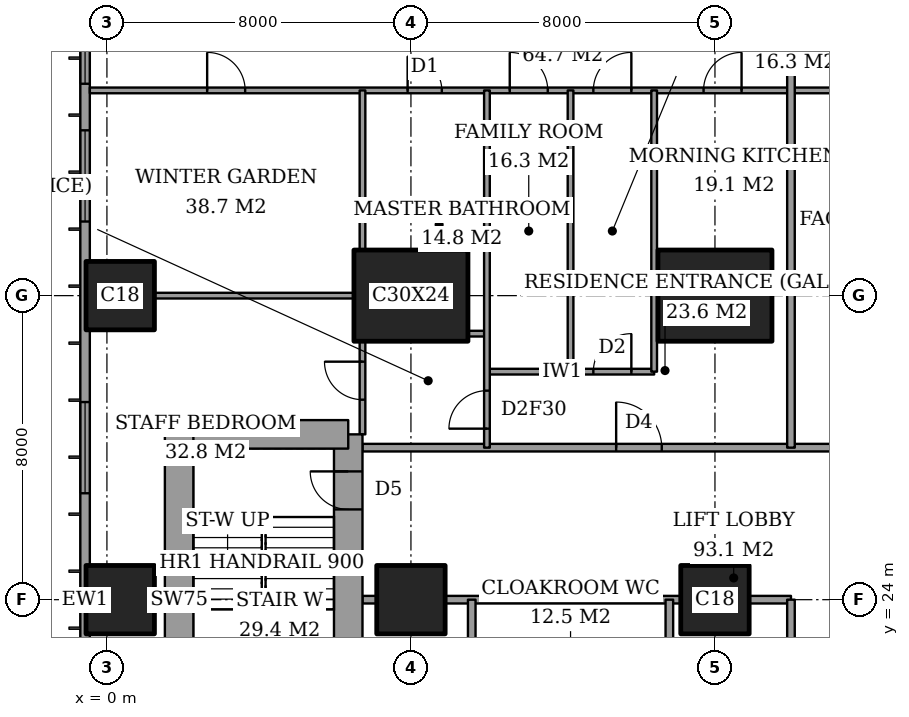
"""IFC4 building model, lengths in metres.
Left out: names, types, materials, properties, quantities, classifications, styles, units other than length and angle.
Written with IfcOpenShell. Run it as: python <this file> out.ifc"""

import sys

from ifc_helpers import new_model, si_unit, direction, frame, frame_2d, origin, origin_2d, place, context, subcontext, project, spatial, rectangle, extrude, element, fill, save


model = new_model("IFC4")
c1 = context("Model", 3, precision=1e-05, world=origin(), true_north=direction((0.0, 1.0)))
c2 = subcontext(c1, "Body", "Model", "MODEL_VIEW")
j1 = project(units=[si_unit("LENGTHUNIT", "METRE"), si_unit("PLANEANGLEUNIT", "RADIAN")], contexts=[c1])
p1 = place(None, origin())
s1 = spatial("IfcSite", under=j1, at=p1, CompositionType="ELEMENT")
p2 = place(p1, origin())
s2 = spatial("IfcBuilding", under=s1, at=p2, CompositionType="ELEMENT")
p3 = place(p2, frame((0.0, 0.0, 182.2)))
s3 = spatial("IfcBuildingStorey", under=s2, at=p3, CompositionType="ELEMENT", Elevation=182.2)
for number, where, z_axis, x_axis in (
    (1, (0.35, 24.0, 0.0), (0.0, 0.0, 1.0), (1.0, 0.0, 0.0)),
    (2, (0.35, 32.0, 0.0), (0.0, 0.0, 1.0), (1.0, 0.0, 0.0)),
    (3, (8.0, 24.0, 0.0), (0.0, 0.0, 1.0), (1.0, 0.0, 0.0)),
):
    element("IfcColumn", number, at=place(p3, frame(where, z_axis=z_axis, x_axis=x_axis)), inside=s3, PredefinedType="COLUMN", context=c2, shape_type="SweptSolid", body=[
        extrude(rectangle(XDim=1.8, YDim=1.8, at=origin_2d()), origin(), (0.0, 0.0, 1.0), 3.6),
    ])
p4 = place(p3, frame((8.0, 32.0, 0.0), z_axis=(0.0, 0.0, 1.0), x_axis=(1.0, 0.0, 0.0)))
e4 = element("IfcColumn", 4, at=p4, inside=s3, PredefinedType="COLUMN", context=c2, shape_type="SweptSolid", body=[
    extrude(rectangle(XDim=3.0, YDim=2.4, at=origin_2d()), origin(), (0.0, 0.0, 1.0), 3.6),
])
p5 = place(p3, frame((16.0, 24.0, 0.0), z_axis=(0.0, 0.0, 1.0), x_axis=(1.0, 0.0, 0.0)))
e5 = element("IfcColumn", 5, at=p5, inside=s3, PredefinedType="COLUMN", context=c2, shape_type="SweptSolid", body=[
    extrude(rectangle(XDim=1.8, YDim=1.8, at=origin_2d()), origin(), (0.0, 0.0, 1.0), 3.6),
])
p6 = place(p3, frame((16.0, 32.0, 0.0), z_axis=(0.0, 0.0, 1.0), x_axis=(1.0, 0.0, 0.0)))
e6 = element("IfcColumn", 6, at=p6, inside=s3, PredefinedType="COLUMN", context=c2, shape_type="SweptSolid", body=[
    extrude(rectangle(XDim=3.0, YDim=2.4, at=origin_2d()), origin(), (0.0, 0.0, 1.0), 3.6),
])
p7 = place(p3, frame((6.35, 19.65, 0.0), z_axis=(0.0, 0.0, 1.0), x_axis=(0.0, 1.0, 0.0)))
e7 = element("IfcWall", 7, at=p7, inside=s3, PredefinedType="SHEAR", context=c2, shape_type="SweptSolid", body=[
    extrude(rectangle(XDim=8.7, YDim=0.75, at=frame_2d((4.35, 0.0))), origin(), (0.0, 0.0, 1.0), 3.6),
])
p8 = place(p7, frame((6.725, 0.0, 0.0)))
e8 = element("IfcOpeningElement", 8, at=p8, cuts=e7, PredefinedType="OPENING", context=c2, shape_type="SweptSolid", body=[
    extrude(rectangle(XDim=1.0, YDim=2.1, at=frame_2d((0.5, 1.05))), frame((0.0, 0.385, 0.0), z_axis=(0.0, -1.0, 0.0), x_axis=(1.0, 0.0, 0.0)), (0.0, 0.0, 1.0), 0.77),
])
p9 = place(p3, frame((6.35, 28.35, 0.0), z_axis=(0.0, 0.0, 1.0), x_axis=(-1.0, 0.0, 0.0)))
e9 = element("IfcWall", 9, at=p9, inside=s3, PredefinedType="SHEAR", context=c2, shape_type="SweptSolid", body=[
    extrude(rectangle(XDim=4.45, YDim=0.75, at=frame_2d((2.225, 0.0))), origin(), (0.0, 0.0, 1.0), 3.6),
])
p10 = place(p3, frame((1.9, 28.35, 0.0), z_axis=(0.0, 0.0, 1.0), x_axis=(0.0, -1.0, 0.0)))
e10 = element("IfcWall", 10, at=p10, inside=s3, PredefinedType="SHEAR", context=c2, shape_type="SweptSolid", body=[
    extrude(rectangle(XDim=8.7, YDim=0.75, at=frame_2d((4.35, 0.0))), origin(), (0.0, 0.0, 1.0), 3.6),
])
p11 = place(p3, frame((-0.575, 44.825, 0.0), z_axis=(0.0, 0.0, 1.0), x_axis=(0.0, -1.0, 0.0)))
e11 = element("IfcWall", 11, at=p11, inside=s3, PredefinedType="SOLIDWALL", context=c2, shape_type="SweptSolid", body=[
    extrude(rectangle(XDim=41.65, YDim=0.25, at=frame_2d((20.825, 0.0))), origin(), (0.0, 0.0, 1.0), 3.6),
])
p12 = place(p11, frame((0.825, 0.0, 0.2)))
e12 = element("IfcOpeningElement", 12, at=p12, cuts=e11, PredefinedType="OPENING", context=c2, shape_type="SweptSolid", body=[
    extrude(rectangle(XDim=2.4, YDim=2.4, at=frame_2d((1.2, 1.2))), frame((0.0, 0.135, 0.0), z_axis=(0.0, -1.0, 0.0), x_axis=(1.0, 0.0, 0.0)), (0.0, 0.0, 1.0), 0.27),
])
p13 = place(p11, frame((6.05, 0.0, 0.2)))
e13 = element("IfcOpeningElement", 13, at=p13, cuts=e11, PredefinedType="OPENING", context=c2, shape_type="SweptSolid", body=[
    extrude(rectangle(XDim=1.2, YDim=2.4, at=frame_2d((0.6, 1.2))), frame((0.0, 0.135, 0.0), z_axis=(0.0, -1.0, 0.0), x_axis=(1.0, 0.0, 0.0)), (0.0, 0.0, 1.0), 0.27),
])
p14 = place(p11, frame((8.475, 0.0, 0.2)))
e14 = element("IfcOpeningElement", 14, at=p14, cuts=e11, PredefinedType="OPENING", context=c2, shape_type="SweptSolid", body=[
    extrude(rectangle(XDim=2.4, YDim=2.4, at=frame_2d((1.2, 1.2))), frame((0.0, 0.135, 0.0), z_axis=(0.0, -1.0, 0.0), x_axis=(1.0, 0.0, 0.0)), (0.0, 0.0, 1.0), 0.27),
])
p15 = place(p11, frame((15.625, 0.0, 0.2)))
e15 = element("IfcOpeningElement", 15, at=p15, cuts=e11, PredefinedType="OPENING", context=c2, shape_type="SweptSolid", body=[
    extrude(rectangle(XDim=2.4, YDim=2.4, at=frame_2d((1.2, 1.2))), frame((0.0, 0.135, 0.0), z_axis=(0.0, -1.0, 0.0), x_axis=(1.0, 0.0, 0.0)), (0.0, 0.0, 1.0), 0.27),
])
p16 = place(p11, frame((23.625, 0.0, 0.2)))
e16 = element("IfcOpeningElement", 16, at=p16, cuts=e11, PredefinedType="OPENING", context=c2, shape_type="SweptSolid", body=[
    extrude(rectangle(XDim=2.4, YDim=2.4, at=frame_2d((1.2, 1.2))), frame((0.0, 0.135, 0.0), z_axis=(0.0, -1.0, 0.0), x_axis=(1.0, 0.0, 0.0)), (0.0, 0.0, 1.0), 0.27),
])
p17 = place(p11, frame((30.775, 0.0, 0.2)))
e17 = element("IfcOpeningElement", 17, at=p17, cuts=e11, PredefinedType="OPENING", context=c2, shape_type="SweptSolid", body=[
    extrude(rectangle(XDim=2.4, YDim=2.4, at=frame_2d((1.2, 1.2))), frame((0.0, 0.135, 0.0), z_axis=(0.0, -1.0, 0.0), x_axis=(1.0, 0.0, 0.0)), (0.0, 0.0, 1.0), 0.27),
])
p18 = place(p11, frame((34.55, 0.0, 0.2)))
e18 = element("IfcOpeningElement", 18, at=p18, cuts=e11, PredefinedType="OPENING", context=c2, shape_type="SweptSolid", body=[
    extrude(rectangle(XDim=1.2, YDim=2.4, at=frame_2d((0.6, 1.2))), frame((0.0, 0.135, 0.0), z_axis=(0.0, -1.0, 0.0), x_axis=(1.0, 0.0, 0.0)), (0.0, 0.0, 1.0), 0.27),
])
p19 = place(p11, frame((38.425, 0.0, 0.2)))
e19 = element("IfcOpeningElement", 19, at=p19, cuts=e11, PredefinedType="OPENING", context=c2, shape_type="SweptSolid", body=[
    extrude(rectangle(XDim=2.4, YDim=2.4, at=frame_2d((1.2, 1.2))), frame((0.0, 0.135, 0.0), z_axis=(0.0, -1.0, 0.0), x_axis=(1.0, 0.0, 0.0)), (0.0, 0.0, 1.0), 0.27),
])
p20 = place(p3, frame((6.725, 24.0, 0.0), z_axis=(0.0, 0.0, 1.0), x_axis=(1.0, 0.0, 0.0)))
e20 = element("IfcWall", 20, at=p20, inside=s3, PredefinedType="PARTITIONING", context=c2, shape_type="SweptSolid", body=[
    extrude(rectangle(XDim=0.375, YDim=0.2, at=frame_2d((0.188, 0.0))), origin(), (0.0, 0.0, 1.0), 3.35),
])
p21 = place(p3, frame((8.9, 24.0, 0.0), z_axis=(0.0, 0.0, 1.0), x_axis=(1.0, 0.0, 0.0)))
e21 = element("IfcWall", 21, at=p21, inside=s3, PredefinedType="PARTITIONING", context=c2, shape_type="SweptSolid", body=[
    extrude(rectangle(XDim=6.2, YDim=0.2, at=frame_2d((3.1, 0.0))), origin(), (0.0, 0.0, 1.0), 3.35),
])
p22 = place(p3, frame((16.9, 24.0, 0.0), z_axis=(0.0, 0.0, 1.0), x_axis=(1.0, 0.0, 0.0)))
e22 = element("IfcWall", 22, at=p22, inside=s3, PredefinedType="PARTITIONING", context=c2, shape_type="SweptSolid", body=[
    extrude(rectangle(XDim=1.1, YDim=0.2, at=frame_2d((0.55, 0.0))), origin(), (0.0, 0.0, 1.0), 3.35),
])
p23 = place(p3, frame((6.725, 28.0, 0.0), z_axis=(0.0, 0.0, 1.0), x_axis=(1.0, 0.0, 0.0)))
e23 = element("IfcWall", 23, at=p23, inside=s3, PredefinedType="PARTITIONING", context=c2, shape_type="SweptSolid", body=[
    extrude(rectangle(XDim=17.275, YDim=0.2, at=frame_2d((8.637, 0.0))), origin(), (0.0, 0.0, 1.0), 3.35),
])
p24 = place(p23, frame((6.675, 0.0, 0.0)))
e24 = element("IfcOpeningElement", 24, at=p24, cuts=e23, PredefinedType="OPENING", context=c2, shape_type="SweptSolid", body=[
    extrude(rectangle(XDim=1.2, YDim=2.4, at=frame_2d((0.6, 1.2))), frame((0.0, 0.11, 0.0), z_axis=(0.0, -1.0, 0.0), x_axis=(1.0, 0.0, 0.0)), (0.0, 0.0, 1.0), 0.22),
])
p25 = place(p23, frame((13.775, 0.0, 0.0)))
e25 = element("IfcOpeningElement", 25, at=p25, cuts=e23, PredefinedType="OPENING", context=c2, shape_type="SweptSolid", body=[
    extrude(rectangle(XDim=1.0, YDim=2.1, at=frame_2d((0.5, 1.05))), frame((0.0, 0.11, 0.0), z_axis=(0.0, -1.0, 0.0), x_axis=(1.0, 0.0, 0.0)), (0.0, 0.0, 1.0), 0.22),
])
p26 = place(p3, frame((10.0, 30.0, 0.0), z_axis=(0.0, 0.0, 1.0), x_axis=(1.0, 0.0, 0.0)))
e26 = element("IfcWall", 26, at=p26, inside=s3, PredefinedType="PARTITIONING", context=c2, shape_type="SweptSolid", body=[
    extrude(rectangle(XDim=4.4, YDim=0.15, at=frame_2d((2.2, 0.0))), origin(), (0.0, 0.0, 1.0), 3.35),
])
p27 = place(p26, frame((2.8, 0.0, 0.0)))
e27 = element("IfcOpeningElement", 27, at=p27, cuts=e26, PredefinedType="OPENING", context=c2, shape_type="SweptSolid", body=[
    extrude(rectangle(XDim=1.0, YDim=2.1, at=frame_2d((0.5, 1.05))), frame((0.0, 0.085, 0.0), z_axis=(0.0, -1.0, 0.0), x_axis=(1.0, 0.0, 0.0)), (0.0, 0.0, 1.0), 0.17),
])
p28 = place(p3, frame((9.5, 31.0, 0.0), z_axis=(0.0, 0.0, 1.0), x_axis=(1.0, 0.0, 0.0)))
e28 = element("IfcWall", 28, at=p28, inside=s3, PredefinedType="PARTITIONING", context=c2, shape_type="SweptSolid", body=[
    extrude(rectangle(XDim=0.5, YDim=0.15, at=frame_2d((0.25, 0.0))), origin(), (0.0, 0.0, 1.0), 3.35),
])
p29 = place(p3, frame((1.25, 32.0, 0.0), z_axis=(0.0, 0.0, 1.0), x_axis=(1.0, 0.0, 0.0)))
e29 = element("IfcWall", 29, at=p29, inside=s3, PredefinedType="PARTITIONING", context=c2, shape_type="SweptSolid", body=[
    extrude(rectangle(XDim=5.25, YDim=0.15, at=frame_2d((2.625, 0.0))), origin(), (0.0, 0.0, 1.0), 2.634),
])
p30 = place(p3, frame((17.5, 32.1, 0.0), z_axis=(0.0, 0.0, 1.0), x_axis=(1.0, 0.0, 0.0)))
e30 = element("IfcWall", 30, at=p30, inside=s3, PredefinedType="PARTITIONING", context=c2, shape_type="SweptSolid", body=[
    extrude(rectangle(XDim=0.5, YDim=0.15, at=frame_2d((0.25, 0.0))), origin(), (0.0, 0.0, 1.0), 2.634),
])
p31 = place(p3, frame((-0.45, 37.4, 0.0), z_axis=(0.0, 0.0, 1.0), x_axis=(1.0, 0.0, 0.0)))
e31 = element("IfcWall", 31, at=p31, inside=s3, PredefinedType="PARTITIONING", context=c2, shape_type="SweptSolid", body=[
    extrude(rectangle(XDim=24.9, YDim=0.15, at=frame_2d((12.45, 0.0))), origin(), (0.0, 0.0, 1.0), 3.35),
])
p32 = place(p31, frame((13.25, 0.0, 0.0)))
e32 = element("IfcOpeningElement", 32, at=p32, cuts=e31, PredefinedType="OPENING", context=c2, shape_type="SweptSolid", body=[
    extrude(rectangle(XDim=1.0, YDim=2.1, at=frame_2d((0.5, 1.05))), frame((0.0, 0.085, 0.0), z_axis=(0.0, -1.0, 0.0), x_axis=(1.0, 0.0, 0.0)), (0.0, 0.0, 1.0), 0.17),
])
p33 = place(p31, frame((3.087, 0.0, 0.0)))
e33 = element("IfcOpeningElement", 33, at=p33, cuts=e31, PredefinedType="OPENING", context=c2, shape_type="SweptSolid", body=[
    extrude(rectangle(XDim=1.0, YDim=2.1, at=frame_2d((0.5, 1.05))), frame((0.0, 0.085, 0.0), z_axis=(0.0, -1.0, 0.0), x_axis=(1.0, 0.0, 0.0)), (0.0, 0.0, 1.0), 0.17),
])
p34 = place(p31, frame((8.363, 0.0, 0.0)))
e34 = element("IfcOpeningElement", 34, at=p34, cuts=e31, PredefinedType="OPENING", context=c2, shape_type="SweptSolid", body=[
    extrude(rectangle(XDim=0.9, YDim=2.1, at=frame_2d((0.45, 1.05))), frame((0.0, 0.085, 0.0), z_axis=(0.0, -1.0, 0.0), x_axis=(1.0, 0.0, 0.0)), (0.0, 0.0, 1.0), 0.17),
])
p35 = place(p31, frame((11.05, 0.0, 0.0)))
e35 = element("IfcOpeningElement", 35, at=p35, cuts=e31, PredefinedType="OPENING", context=c2, shape_type="SweptSolid", body=[
    extrude(rectangle(XDim=1.0, YDim=2.1, at=frame_2d((0.5, 1.05))), frame((0.0, 0.085, 0.0), z_axis=(0.0, -1.0, 0.0), x_axis=(1.0, 0.0, 0.0)), (0.0, 0.0, 1.0), 0.17),
])
p36 = place(p31, frame((16.15, 0.0, 0.0)))
e36 = element("IfcOpeningElement", 36, at=p36, cuts=e31, PredefinedType="OPENING", context=c2, shape_type="SweptSolid", body=[
    extrude(rectangle(XDim=1.0, YDim=2.1, at=frame_2d((0.5, 1.05))), frame((0.0, 0.085, 0.0), z_axis=(0.0, -1.0, 0.0), x_axis=(1.0, 0.0, 0.0)), (0.0, 0.0, 1.0), 0.17),
])
p37 = place(p3, frame((18.0, 38.2, 0.0), z_axis=(0.0, 0.0, 1.0), x_axis=(1.0, 0.0, 0.0)))
e37 = element("IfcWall", 37, at=p37, inside=s3, PredefinedType="PARTITIONING", context=c2, shape_type="SweptSolid", body=[
    extrude(rectangle(XDim=6.45, YDim=0.2, at=frame_2d((3.225, 0.0))), origin(), (0.0, 0.0, 1.0), 3.35),
])
p38 = place(p3, frame((6.725, 28.35, 0.0), z_axis=(0.0, 0.0, 1.0), x_axis=(0.0, 1.0, 0.0)))
e38 = element("IfcWall", 38, at=p38, inside=s3, PredefinedType="PARTITIONING", context=c2, shape_type="SweptSolid", body=[
    extrude(rectangle(XDim=2.45, YDim=0.15, at=frame_2d((1.225, 0.0))), origin(), (0.0, 0.0, 1.0), 3.35),
])
p39 = place(p38, frame((0.913, 0.0, 0.0)))
e39 = element("IfcOpeningElement", 39, at=p39, cuts=e38, PredefinedType="OPENING", context=c2, shape_type="SweptSolid", body=[
    extrude(rectangle(XDim=1.0, YDim=2.1, at=frame_2d((0.5, 1.05))), frame((0.0, 0.085, 0.0), z_axis=(0.0, -1.0, 0.0), x_axis=(1.0, 0.0, 0.0)), (0.0, 0.0, 1.0), 0.17),
])
p40 = place(p3, frame((6.725, 33.2, 0.0), z_axis=(0.0, 0.0, 1.0), x_axis=(0.0, 1.0, 0.0)))
e40 = element("IfcWall", 40, at=p40, inside=s3, PredefinedType="PARTITIONING", context=c2, shape_type="SweptSolid", body=[
    extrude(rectangle(XDim=4.2, YDim=0.15, at=frame_2d((2.1, 0.0))), origin(), (0.0, 0.0, 1.0), 3.35),
])
p41 = place(p3, frame((9.6, 21.6, 0.0), z_axis=(0.0, 0.0, 1.0), x_axis=(0.0, 1.0, 0.0)))
e41 = element("IfcWall", 41, at=p41, inside=s3, PredefinedType="PARTITIONING", context=c2, shape_type="SweptSolid", body=[
    extrude(rectangle(XDim=2.4, YDim=0.2, at=frame_2d((1.2, 0.0))), origin(), (0.0, 0.0, 1.0), 3.35),
])
p42 = place(p3, frame((10.0, 28.0, 0.0), z_axis=(0.0, 0.0, 1.0), x_axis=(0.0, 1.0, 0.0)))
e42 = element("IfcWall", 42, at=p42, inside=s3, PredefinedType="PARTITIONING", context=c2, shape_type="SweptSolid", body=[
    extrude(rectangle(XDim=9.4, YDim=0.15, at=frame_2d((4.7, 0.0))), origin(), (0.0, 0.0, 1.0), 3.35),
])
p43 = place(p42, frame((0.5, 0.0, 0.0)))
e43 = element("IfcOpeningElement", 43, at=p43, cuts=e42, PredefinedType="OPENING", context=c2, shape_type="SweptSolid", body=[
    extrude(rectangle(XDim=1.0, YDim=2.1, at=frame_2d((0.5, 1.05))), frame((0.0, 0.085, 0.0), z_axis=(0.0, -1.0, 0.0), x_axis=(1.0, 0.0, 0.0)), (0.0, 0.0, 1.0), 0.17),
])
for number, where, z_axis, x_axis in (
    (44, (12.2, 30.0, 0.0), (0.0, 0.0, 1.0), (0.0, 1.0, 0.0)),
    (45, (14.4, 30.0, 0.0), (0.0, 0.0, 1.0), (0.0, 1.0, 0.0)),
):
    element("IfcWall", number, at=place(p3, frame(where, z_axis=z_axis, x_axis=x_axis)), inside=s3, PredefinedType="PARTITIONING", context=c2, shape_type="SweptSolid", body=[
        extrude(rectangle(XDim=7.4, YDim=0.15, at=frame_2d((3.7, 0.0))), origin(), (0.0, 0.0, 1.0), 3.35),
    ])
p44 = place(p3, frame((14.8, 21.6, 0.0), z_axis=(0.0, 0.0, 1.0), x_axis=(0.0, 1.0, 0.0)))
e46 = element("IfcWall", 46, at=p44, inside=s3, PredefinedType="PARTITIONING", context=c2, shape_type="SweptSolid", body=[
    extrude(rectangle(XDim=2.4, YDim=0.2, at=frame_2d((1.2, 0.0))), origin(), (0.0, 0.0, 1.0), 3.35),
])
p45 = place(p3, frame((18.0, 9.8, 0.0), z_axis=(0.0, 0.0, 1.0), x_axis=(0.0, 1.0, 0.0)))
e47 = element("IfcWall", 47, at=p45, inside=s3, PredefinedType="PARTITIONING", context=c2, shape_type="SweptSolid", body=[
    extrude(rectangle(XDim=14.2, YDim=0.2, at=frame_2d((7.1, 0.0))), origin(), (0.0, 0.0, 1.0), 3.35),
])
p46 = place(p45, frame((11.6, 0.0, 0.0)))
e48 = element("IfcOpeningElement", 48, at=p46, cuts=e47, PredefinedType="OPENING", context=c2, shape_type="SweptSolid", body=[
    extrude(rectangle(XDim=1.2, YDim=2.4, at=frame_2d((0.6, 1.2))), frame((0.0, 0.11, 0.0), z_axis=(0.0, -1.0, 0.0), x_axis=(1.0, 0.0, 0.0)), (0.0, 0.0, 1.0), 0.22),
])
p47 = place(p3, frame((18.0, 28.0, 0.0), z_axis=(0.0, 0.0, 1.0), x_axis=(0.0, 1.0, 0.0)))
e49 = element("IfcWall", 49, at=p47, inside=s3, PredefinedType="PARTITIONING", context=c2, shape_type="SweptSolid", body=[
    extrude(rectangle(XDim=10.2, YDim=0.2, at=frame_2d((5.1, 0.0))), origin(), (0.0, 0.0, 1.0), 3.35),
])
p48 = place(p13, origin())
e50 = element("IfcWindow", 50, at=p48, inside=s3, PartitioningType="SINGLE_PANEL", PredefinedType="WINDOW", context=c2, shape_type="SweptSolid", body=[
    extrude(rectangle(XDim=1.2, YDim=2.4, at=frame_2d((0.6, 1.2))), frame((0.0, 0.03, 0.0), z_axis=(0.0, -1.0, 0.0), x_axis=(1.0, 0.0, 0.0)), (0.0, 0.0, 1.0), 0.06),
])
fill(e13, e50)
p49 = place(p14, origin())
e51 = element("IfcWindow", 51, at=p49, inside=s3, PartitioningType="SINGLE_PANEL", PredefinedType="WINDOW", context=c2, shape_type="SweptSolid", body=[
    extrude(rectangle(XDim=2.4, YDim=2.4, at=frame_2d((1.2, 1.2))), frame((0.0, 0.03, 0.0), z_axis=(0.0, -1.0, 0.0), x_axis=(1.0, 0.0, 0.0)), (0.0, 0.0, 1.0), 0.06),
])
fill(e14, e51)
p50 = place(p15, origin())
e52 = element("IfcWindow", 52, at=p50, inside=s3, PartitioningType="SINGLE_PANEL", PredefinedType="WINDOW", context=c2, shape_type="SweptSolid", body=[
    extrude(rectangle(XDim=2.4, YDim=2.4, at=frame_2d((1.2, 1.2))), frame((0.0, 0.03, 0.0), z_axis=(0.0, -1.0, 0.0), x_axis=(1.0, 0.0, 0.0)), (0.0, 0.0, 1.0), 0.06),
])
fill(e15, e52)
p51 = place(p32, origin())
e53 = element("IfcDoor", 53, at=p51, inside=s3, OperationType="SINGLE_SWING_LEFT", PredefinedType="DOOR", context=c2, shape_type="SweptSolid", body=[
    extrude(rectangle(XDim=1.0, YDim=2.1, at=frame_2d((0.5, 1.05))), frame((0.0, 0.025, 0.0), z_axis=(0.0, -1.0, 0.0), x_axis=(1.0, 0.0, 0.0)), (0.0, 0.0, 1.0), 0.05),
])
fill(e32, e53)
p52 = place(p33, origin())
e54 = element("IfcDoor", 54, at=p52, inside=s3, OperationType="SINGLE_SWING_RIGHT", PredefinedType="DOOR", context=c2, shape_type="SweptSolid", body=[
    extrude(rectangle(XDim=1.0, YDim=2.1, at=frame_2d((0.5, 1.05))), frame((0.0, 0.025, 0.0), z_axis=(0.0, -1.0, 0.0), x_axis=(1.0, 0.0, 0.0)), (0.0, 0.0, 1.0), 0.05),
])
fill(e33, e54)
p53 = place(p39, origin())
e55 = element("IfcDoor", 55, at=p53, inside=s3, OperationType="SINGLE_SWING_LEFT", PredefinedType="DOOR", context=c2, shape_type="SweptSolid", body=[
    extrude(rectangle(XDim=1.0, YDim=2.1, at=frame_2d((0.5, 1.05))), frame((0.0, 0.025, 0.0), z_axis=(0.0, -1.0, 0.0), x_axis=(1.0, 0.0, 0.0)), (0.0, 0.0, 1.0), 0.05),
])
fill(e39, e55)
p54 = place(p34, origin())
e56 = element("IfcDoor", 56, at=p54, inside=s3, OperationType="SINGLE_SWING_RIGHT", PredefinedType="DOOR", context=c2, shape_type="SweptSolid", body=[
    extrude(rectangle(XDim=0.9, YDim=2.1, at=frame_2d((0.45, 1.05))), frame((0.0, 0.025, 0.0), z_axis=(0.0, -1.0, 0.0), x_axis=(1.0, 0.0, 0.0)), (0.0, 0.0, 1.0), 0.05),
])
fill(e34, e56)
p55 = place(p43, origin())
e57 = element("IfcDoor", 57, at=p55, inside=s3, OperationType="SINGLE_SWING_RIGHT", PredefinedType="DOOR", context=c2, shape_type="SweptSolid", body=[
    extrude(rectangle(XDim=1.0, YDim=2.1, at=frame_2d((0.5, 1.05))), frame((0.0, 0.025, 0.0), z_axis=(0.0, -1.0, 0.0), x_axis=(1.0, 0.0, 0.0)), (0.0, 0.0, 1.0), 0.05),
])
fill(e43, e57)
p56 = place(p24, origin())
e58 = element("IfcDoor", 58, at=p56, inside=s3, OperationType="SINGLE_SWING_RIGHT", PredefinedType="DOOR", context=c2, shape_type="SweptSolid", body=[
    extrude(rectangle(XDim=1.2, YDim=2.4, at=frame_2d((0.6, 1.2))), frame((0.0, 0.025, 0.0), z_axis=(0.0, -1.0, 0.0), x_axis=(1.0, 0.0, 0.0)), (0.0, 0.0, 1.0), 0.05),
])
fill(e24, e58)
p57 = place(p35, origin())
e59 = element("IfcDoor", 59, at=p57, inside=s3, OperationType="SINGLE_SWING_RIGHT", PredefinedType="DOOR", context=c2, shape_type="SweptSolid", body=[
    extrude(rectangle(XDim=1.0, YDim=2.1, at=frame_2d((0.5, 1.05))), frame((0.0, 0.025, 0.0), z_axis=(0.0, -1.0, 0.0), x_axis=(1.0, 0.0, 0.0)), (0.0, 0.0, 1.0), 0.05),
])
fill(e35, e59)
p58 = place(p27, origin())
e60 = element("IfcDoor", 60, at=p58, inside=s3, OperationType="SINGLE_SWING_LEFT", PredefinedType="DOOR", context=c2, shape_type="SweptSolid", body=[
    extrude(rectangle(XDim=1.0, YDim=2.1, at=frame_2d((0.5, 1.05))), frame((0.0, 0.025, 0.0), z_axis=(0.0, -1.0, 0.0), x_axis=(1.0, 0.0, 0.0)), (0.0, 0.0, 1.0), 0.05),
])
fill(e27, e60)
p59 = place(p36, origin())
e61 = element("IfcDoor", 61, at=p59, inside=s3, OperationType="SINGLE_SWING_LEFT", PredefinedType="DOOR", context=c2, shape_type="SweptSolid", body=[
    extrude(rectangle(XDim=1.0, YDim=2.1, at=frame_2d((0.5, 1.05))), frame((0.0, 0.025, 0.0), z_axis=(0.0, -1.0, 0.0), x_axis=(1.0, 0.0, 0.0)), (0.0, 0.0, 1.0), 0.05),
])
fill(e36, e61)
p60 = place(p8, origin())
e62 = element("IfcDoor", 62, at=p60, inside=s3, OperationType="SINGLE_SWING_LEFT", PredefinedType="DOOR", context=c2, shape_type="SweptSolid", body=[
    extrude(rectangle(XDim=1.0, YDim=2.1, at=frame_2d((0.5, 1.05))), frame((0.0, 0.025, 0.0), z_axis=(0.0, -1.0, 0.0), x_axis=(1.0, 0.0, 0.0)), (0.0, 0.0, 1.0), 0.05),
])
fill(e8, e62)
save(model, sys.argv[1])
